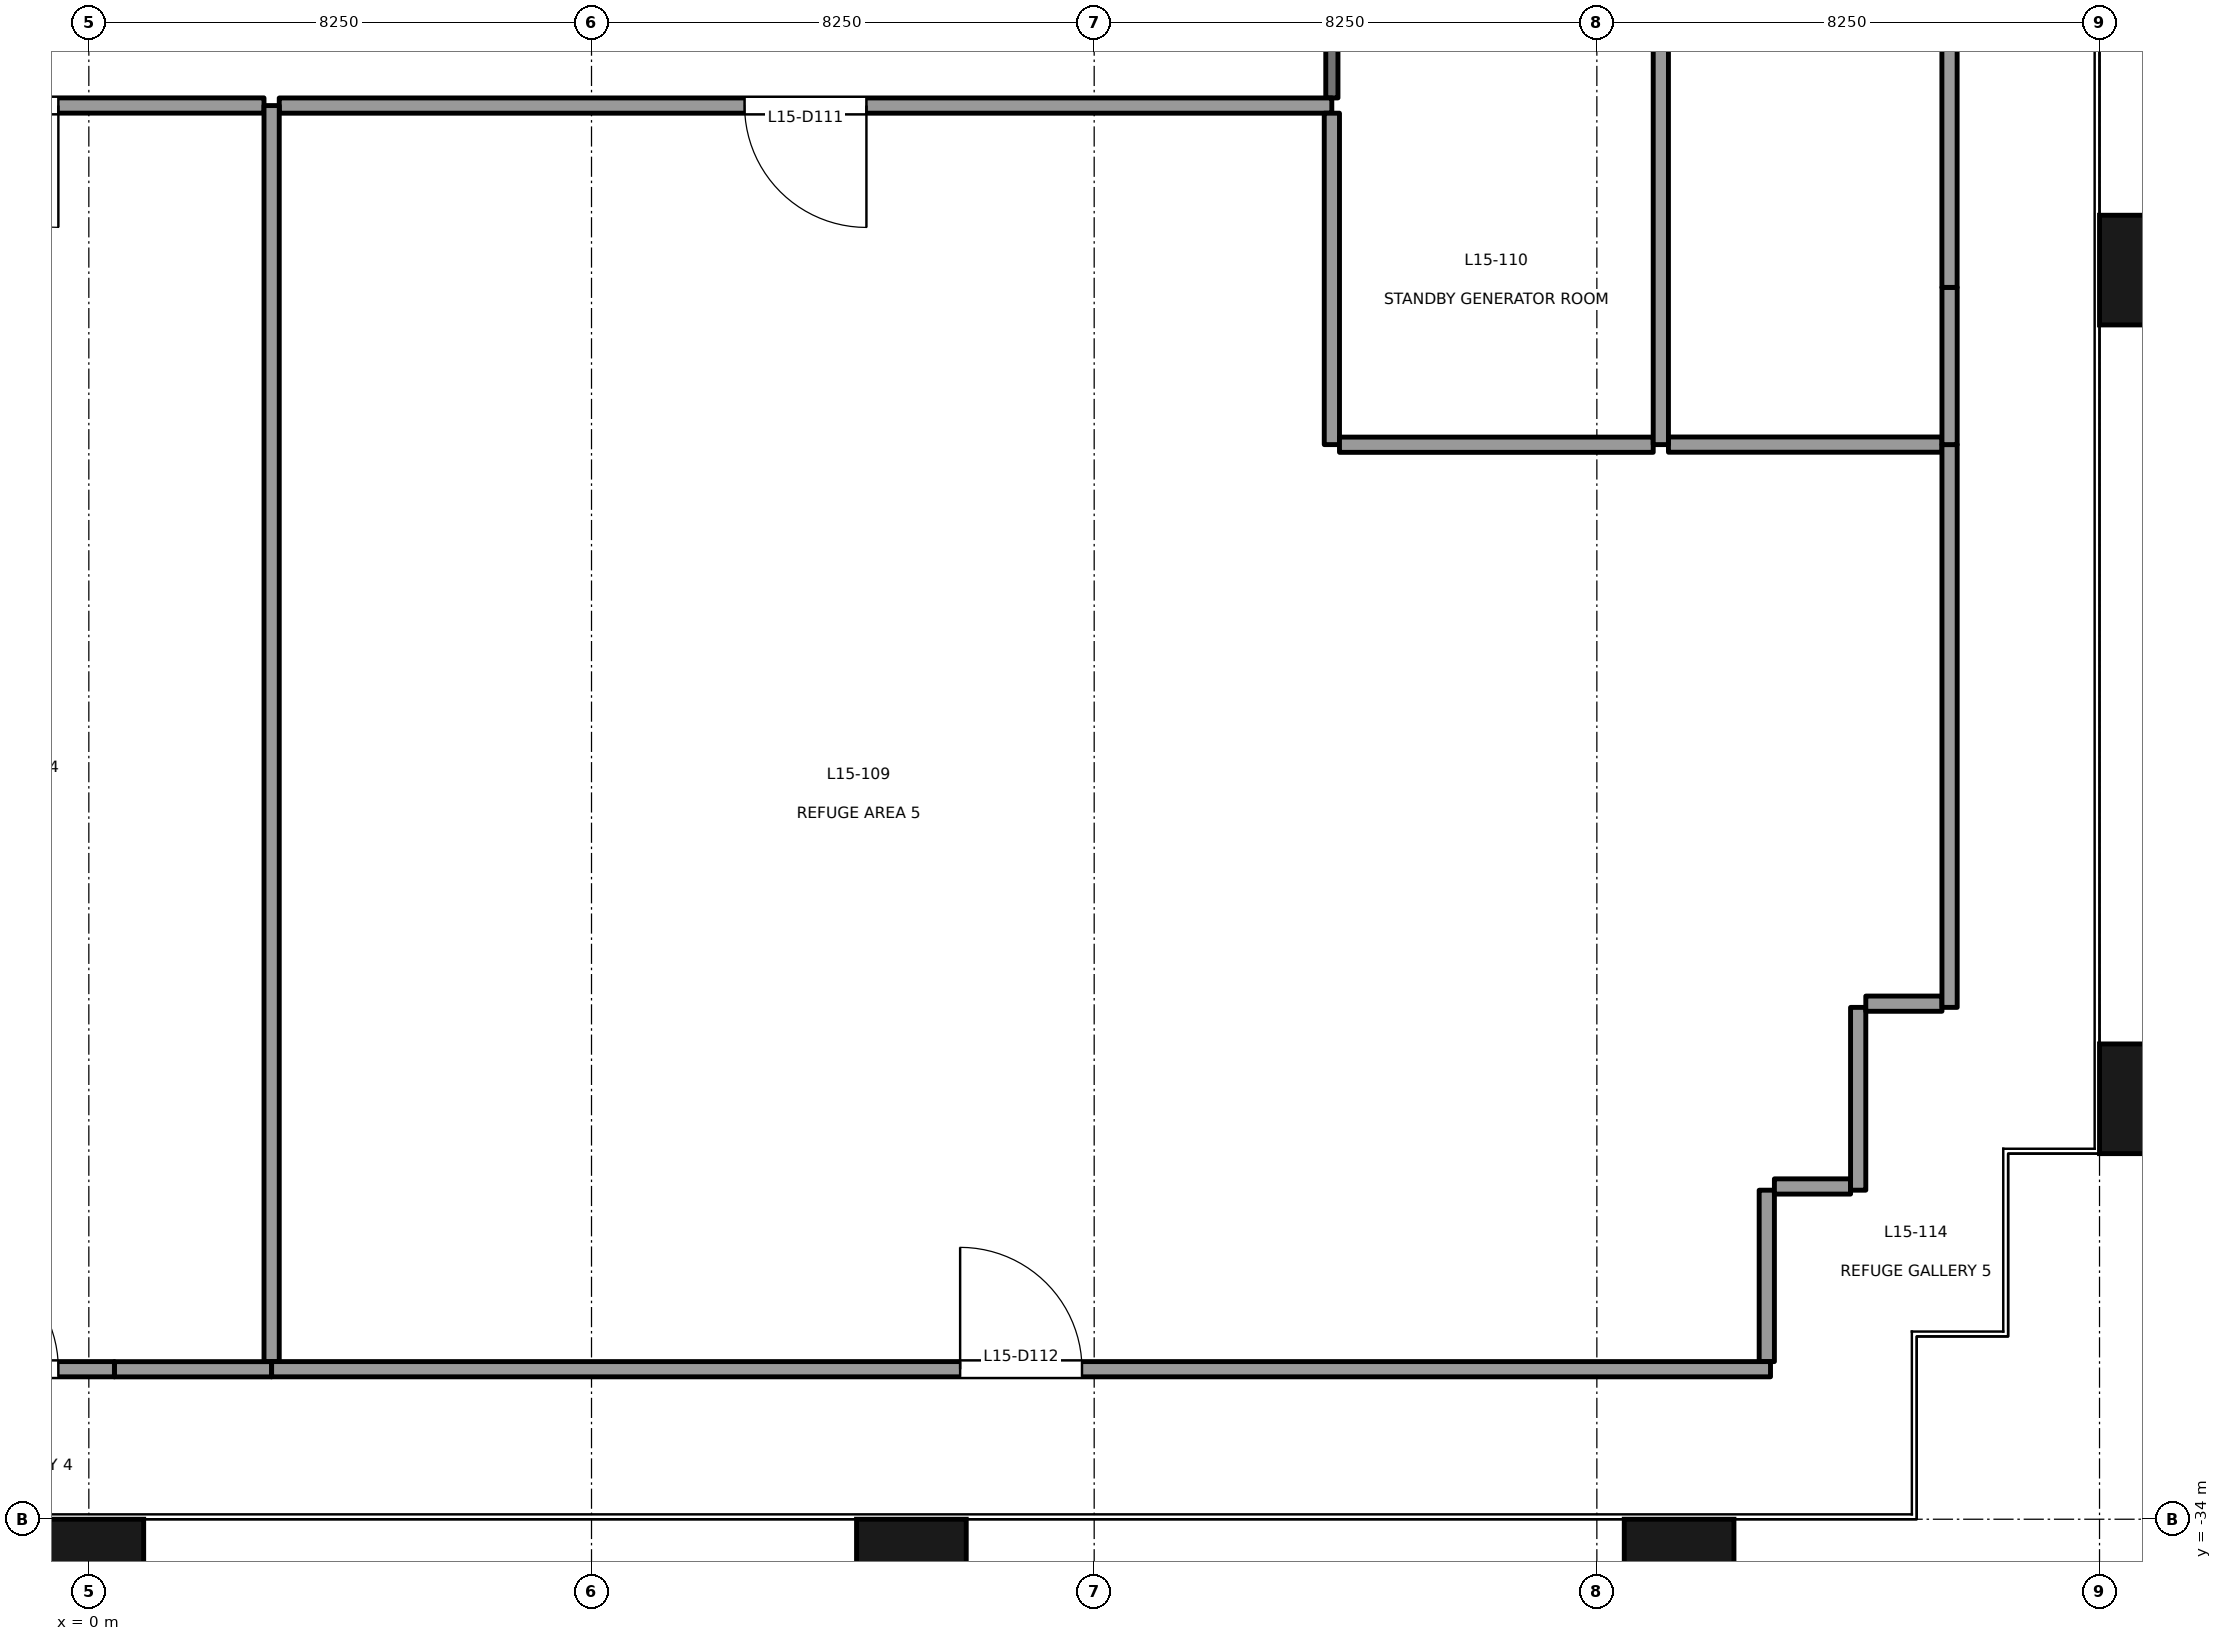
"""IFC4 building model, lengths in metres.
Left out: names, types, materials, properties, quantities, classifications, styles, units other than length and angle.
Written with IfcOpenShell. Run it as: python <this file> out.ifc"""

import sys

from ifc_helpers import new_model, si_unit, direction, frame, frame_2d, origin, origin_2d, place, context, subcontext, project, spatial, rectangle, extrude, element, fill, save


model = new_model("IFC4")
c1 = context("Model", 3, precision=1e-05, world=origin(), true_north=direction((0.0, 1.0)))
c2 = subcontext(c1, "Body", "Model", "MODEL_VIEW")
j1 = project(units=[si_unit("LENGTHUNIT", "METRE"), si_unit("PLANEANGLEUNIT", "RADIAN")], contexts=[c1])
p1 = place(None, origin())
s1 = spatial("IfcSite", under=j1, at=p1, CompositionType="ELEMENT")
p2 = place(p1, origin())
s2 = spatial("IfcBuilding", under=s1, at=p2, CompositionType="ELEMENT")
p3 = place(p2, frame((0.0, 0.0, 69.3)))
s3 = spatial("IfcBuildingStorey", under=s2, at=p3, CompositionType="ELEMENT", Elevation=69.3)
for number, where, z_axis, x_axis in (
    (1, (0.0, -34.9, -0.2), (0.0, 0.0, 1.0), (1.0, 0.0, 0.0)),
    (2, (13.5, -34.9, -0.2), (0.0, 0.0, 1.0), (1.0, 0.0, 0.0)),
    (3, (26.1, -34.9, -0.2), (0.0, 0.0, 1.0), (1.0, 0.0, 0.0)),
    (4, (33.9, -27.1, -0.2), (0.0, 0.0, 1.0), (0.0, 1.0, 0.0)),
    (5, (33.9, -13.5, -0.2), (0.0, 0.0, 1.0), (0.0, 1.0, 0.0)),
):
    element("IfcColumn", number, at=place(p3, frame(where, z_axis=z_axis, x_axis=x_axis)), inside=s3, PredefinedType="COLUMN", context=c2, shape_type="SweptSolid", body=[
        extrude(rectangle(XDim=1.8, YDim=1.8, at=origin_2d()), origin(), (0.0, 0.0, 1.0), 5.0),
    ])
p4 = place(p3, frame((2.875, -10.799, 0.0), z_axis=(0.0, 0.0, 1.0), x_axis=(-1.0, 0.0, 0.0)))
e6 = element("IfcWall", 6, at=p4, inside=s3, PredefinedType="PARTITIONING", context=c2, shape_type="SweptSolid", body=[
    extrude(rectangle(XDim=8.75, YDim=0.25, at=frame_2d((4.375, 0.0))), origin(), (0.0, 0.0, 1.0), 3.8),
])
p5 = place(p4, frame((3.375, 0.0, 0.0)))
e7 = element("IfcOpeningElement", 7, at=p5, cuts=e6, PredefinedType="OPENING", context=c2, shape_type="SweptSolid", body=[
    extrude(rectangle(XDim=2.0, YDim=2.1, at=frame_2d((1.0, 1.05))), frame((0.0, 0.135, 0.0), z_axis=(0.0, -1.0, 0.0), x_axis=(1.0, 0.0, 0.0)), (0.0, 0.0, 1.0), 0.271),
])
p6 = place(p3, frame((20.4, -10.8, 0.0), z_axis=(0.0, 0.0, 1.0), x_axis=(-1.0, 0.0, 0.0)))
e8 = element("IfcWall", 8, at=p6, inside=s3, PredefinedType="PARTITIONING", context=c2, shape_type="SweptSolid", body=[
    extrude(rectangle(XDim=17.275, YDim=0.25, at=frame_2d((8.637, 0.0))), origin(), (0.0, 0.0, 1.0), 2.15),
])
p7 = place(p6, frame((7.638, 0.0, 0.0)))
e9 = element("IfcOpeningElement", 9, at=p7, cuts=e8, PredefinedType="OPENING", context=c2, shape_type="SweptSolid", body=[
    extrude(rectangle(XDim=2.0, YDim=2.1, at=frame_2d((1.0, 1.05))), frame((0.0, 0.135, 0.0), z_axis=(0.0, -1.0, 0.0), x_axis=(1.0, 0.0, 0.0)), (0.0, 0.0, 1.0), 0.271),
])
p8 = place(p3, frame((20.401, -7.5, 0.0), z_axis=(0.0, 0.0, 1.0), x_axis=(0.0, -1.0, 0.0)))
e10 = element("IfcWall", 10, at=p8, inside=s3, PredefinedType="PARTITIONING", context=c2, shape_type="SweptSolid", body=[
    extrude(rectangle(XDim=3.175, YDim=0.2, at=frame_2d((1.587, 0.0))), origin(), (0.0, 0.0, 1.0), 4.2),
])
p9 = place(p8, frame((1.137, 0.0, 0.0)))
e11 = element("IfcOpeningElement", 11, at=p9, cuts=e10, PredefinedType="OPENING", context=c2, shape_type="SweptSolid", body=[
    extrude(rectangle(XDim=0.9, YDim=2.1, at=frame_2d((0.45, 1.05))), frame((0.0, 0.111, 0.0), z_axis=(0.0, -1.0, 0.0), x_axis=(1.0, 0.0, 0.0)), (0.0, 0.0, 1.0), 0.221),
])
p10 = place(p3, frame((3.0, -10.8, 0.0), z_axis=(0.0, 0.0, 1.0), x_axis=(0.0, -1.0, 0.0)))
e12 = element("IfcWall", 12, at=p10, inside=s3, PredefinedType="PARTITIONING", context=c2, shape_type="SweptSolid", body=[
    extrude(rectangle(XDim=20.613, YDim=0.25, at=frame_2d((10.307, 0.0))), origin(), (0.0, 0.0, 1.0), 4.8),
])
p11 = place(p3, frame((3.0, -31.539, 0.0), z_axis=(0.0, 0.0, 1.0), x_axis=(-1.0, 0.0, 0.0)))
e13 = element("IfcWall", 13, at=p11, inside=s3, PredefinedType="PARTITIONING", context=c2, shape_type="SweptSolid", body=[
    extrude(rectangle(XDim=2.58, YDim=0.25, at=frame_2d((1.29, 0.0))), origin(), (0.0, 0.0, 1.0), 4.8),
])
p12 = place(p3, frame((-3.42, -31.538, 0.0), z_axis=(0.0, 0.0, 1.0), x_axis=(1.0, 0.0, 0.0)))
e14 = element("IfcWall", 14, at=p12, inside=s3, PredefinedType="PARTITIONING", context=c2, shape_type="SweptSolid", body=[
    extrude(rectangle(XDim=3.84, YDim=0.25, at=frame_2d((1.92, 0.0))), origin(), (0.0, 0.0, 1.0), 3.8),
])
p13 = place(p12, frame((0.92, 0.0, 0.0)))
e15 = element("IfcOpeningElement", 15, at=p13, cuts=e14, PredefinedType="OPENING", context=c2, shape_type="SweptSolid", body=[
    extrude(rectangle(XDim=2.0, YDim=2.1, at=frame_2d((1.0, 1.05))), frame((0.0, 0.135, 0.0), z_axis=(0.0, -1.0, 0.0), x_axis=(1.0, 0.0, 0.0)), (0.0, 0.0, 1.0), 0.271),
])
p14 = place(p3, frame((20.401, -10.925, 0.0), z_axis=(0.0, 0.0, 1.0), x_axis=(0.0, -1.0, 0.0)))
e16 = element("IfcWall", 16, at=p14, inside=s3, PredefinedType="PARTITIONING", context=c2, shape_type="SweptSolid", body=[
    extrude(rectangle(XDim=5.439, YDim=0.25, at=frame_2d((2.719, 0.0))), origin(), (0.0, 0.0, 1.0), 4.0),
])
p15 = place(p3, frame((20.526, -16.366, 0.0), z_axis=(0.0, 0.0, 1.0), x_axis=(1.0, 0.0, 0.0)))
e17 = element("IfcWall", 17, at=p15, inside=s3, PredefinedType="PARTITIONING", context=c2, shape_type="SweptSolid", body=[
    extrude(rectangle(XDim=5.149, YDim=0.25, at=frame_2d((2.575, 0.0))), origin(), (0.0, 0.0, 1.0), 4.8),
])
p16 = place(p3, frame((25.925, -16.364, 0.0), z_axis=(0.0, 0.0, 1.0), x_axis=(1.0, 0.0, 0.0)))
e18 = element("IfcWall", 18, at=p16, inside=s3, PredefinedType="PARTITIONING", context=c2, shape_type="SweptSolid", body=[
    extrude(rectangle(XDim=4.489, YDim=0.25, at=frame_2d((2.245, 0.0))), origin(), (0.0, 0.0, 1.0), 4.8),
])
p17 = place(p3, frame((27.539, -28.6, 0.0), z_axis=(0.0, 0.0, 1.0), x_axis=(0.0, -1.0, 0.0)))
e19 = element("IfcWall", 19, at=p17, inside=s3, PredefinedType="PARTITIONING", context=c2, shape_type="SweptSolid", body=[
    extrude(rectangle(XDim=2.813, YDim=0.25, at=frame_2d((1.406, 0.0))), origin(), (0.0, 0.0, 1.0), 4.8),
])
p18 = place(p3, frame((3.0, -31.538, 0.0), z_axis=(0.0, 0.0, 1.0), x_axis=(1.0, 0.0, 0.0)))
e20 = element("IfcWall", 20, at=p18, inside=s3, PredefinedType="PARTITIONING", context=c2, shape_type="SweptSolid", body=[
    extrude(rectangle(XDim=24.6, YDim=0.25, at=frame_2d((12.3, 0.0))), origin(), (0.0, 0.0, 1.0), 2.15),
])
p19 = place(p18, frame((11.3, 0.0, 0.0)))
e21 = element("IfcOpeningElement", 21, at=p19, cuts=e20, PredefinedType="OPENING", context=c2, shape_type="SweptSolid", body=[
    extrude(rectangle(XDim=2.0, YDim=2.1, at=frame_2d((1.0, 1.05))), frame((0.0, 0.135, 0.0), z_axis=(0.0, -1.0, 0.0), x_axis=(1.0, 0.0, 0.0)), (0.0, 0.0, 1.0), 0.271),
])
p20 = place(p3, frame((28.914, -28.539, 0.0), z_axis=(0.0, 0.0, 1.0), x_axis=(-1.0, 0.0, 0.0)))
e22 = element("IfcWall", 22, at=p20, inside=s3, PredefinedType="PARTITIONING", context=c2, shape_type="SweptSolid", body=[
    extrude(rectangle(XDim=1.25, YDim=0.25, at=frame_2d((0.625, 0.0))), origin(), (0.0, 0.0, 1.0), 4.8),
])
p21 = place(p3, frame((29.039, -25.6, 0.0), z_axis=(0.0, 0.0, 1.0), x_axis=(0.0, -1.0, 0.0)))
e23 = element("IfcWall", 23, at=p21, inside=s3, PredefinedType="PARTITIONING", context=c2, shape_type="SweptSolid", body=[
    extrude(rectangle(XDim=3.0, YDim=0.25, at=frame_2d((1.5, 0.0))), origin(), (0.0, 0.0, 1.0), 4.8),
])
p22 = place(p3, frame((30.414, -25.539, 0.0), z_axis=(0.0, 0.0, 1.0), x_axis=(-1.0, 0.0, 0.0)))
e24 = element("IfcWall", 24, at=p22, inside=s3, PredefinedType="PARTITIONING", context=c2, shape_type="SweptSolid", body=[
    extrude(rectangle(XDim=1.25, YDim=0.25, at=frame_2d((0.625, 0.0))), origin(), (0.0, 0.0, 1.0), 4.8),
])
p23 = place(p3, frame((30.539, -16.364, 0.0), z_axis=(0.0, 0.0, 1.0), x_axis=(0.0, -1.0, 0.0)))
e25 = element("IfcWall", 25, at=p23, inside=s3, PredefinedType="PARTITIONING", context=c2, shape_type="SweptSolid", body=[
    extrude(rectangle(XDim=9.236, YDim=0.25, at=frame_2d((4.618, 0.0))), origin(), (0.0, 0.0, 1.0), 4.2),
])
p24 = place(p3, frame((25.8, -7.364, 0.0), z_axis=(0.0, 0.0, 1.0), x_axis=(0.0, -1.0, 0.0)))
e26 = element("IfcWall", 26, at=p24, inside=s3, PredefinedType="PARTITIONING", context=c2, shape_type="SweptSolid", body=[
    extrude(rectangle(XDim=9.0, YDim=0.25, at=frame_2d((4.5, 0.0))), origin(), (0.0, 0.0, 1.0), 4.0),
])
p25 = place(p3, frame((30.539, -13.784, 0.0), z_axis=(0.0, 0.0, 1.0), x_axis=(0.0, -1.0, 0.0)))
e27 = element("IfcWall", 27, at=p25, inside=s3, PredefinedType="PARTITIONING", context=c2, shape_type="SweptSolid", body=[
    extrude(rectangle(XDim=2.58, YDim=0.25, at=frame_2d((1.29, 0.0))), origin(), (0.0, 0.0, 1.0), 4.8),
])
p26 = place(p3, frame((30.538, -13.784, 0.0), z_axis=(0.0, 0.0, 1.0), x_axis=(0.0, 1.0, 0.0)))
e28 = element("IfcWall", 28, at=p26, inside=s3, PredefinedType="PARTITIONING", context=c2, shape_type="SweptSolid", body=[
    extrude(rectangle(XDim=11.966, YDim=0.25, at=frame_2d((5.983, 0.0))), origin(), (0.0, 0.0, 1.0), 4.0),
])
p27 = place(p26, frame((4.983, 0.0, 0.0)))
e29 = element("IfcOpeningElement", 29, at=p27, cuts=e28, PredefinedType="OPENING", context=c2, shape_type="SweptSolid", body=[
    extrude(rectangle(XDim=2.0, YDim=2.1, at=frame_2d((1.0, 1.05))), frame((0.0, 0.135, 0.0), z_axis=(0.0, -1.0, 0.0), x_axis=(1.0, 0.0, 0.0)), (0.0, 0.0, 1.0), 0.271),
])
p28 = place(p5, origin())
e30 = element("IfcDoor", 30, at=p28, inside=s3, OperationType="DOUBLE_DOOR_SINGLE_SWING", PredefinedType="DOOR", context=c2, shape_type="SweptSolid", body=[
    extrude(rectangle(XDim=2.0, YDim=2.1, at=frame_2d((1.0, 1.05))), frame((0.0, 0.025, 0.0), z_axis=(0.0, -1.0, 0.0), x_axis=(1.0, 0.0, 0.0)), (0.0, 0.0, 1.0), 0.05),
])
fill(e7, e30)
p29 = place(p13, origin())
e31 = element("IfcDoor", 31, at=p29, inside=s3, OperationType="DOUBLE_DOOR_SINGLE_SWING", PredefinedType="DOOR", context=c2, shape_type="SweptSolid", body=[
    extrude(rectangle(XDim=2.0, YDim=2.1, at=frame_2d((1.0, 1.05))), frame((0.0, 0.025, 0.0), z_axis=(0.0, -1.0, 0.0), x_axis=(1.0, 0.0, 0.0)), (0.0, 0.0, 1.0), 0.05),
])
fill(e15, e31)
p30 = place(p7, origin())
e32 = element("IfcDoor", 32, at=p30, inside=s3, OperationType="DOUBLE_DOOR_SINGLE_SWING", PredefinedType="DOOR", context=c2, shape_type="SweptSolid", body=[
    extrude(rectangle(XDim=2.0, YDim=2.1, at=frame_2d((1.0, 1.05))), frame((0.0, 0.025, 0.0), z_axis=(0.0, -1.0, 0.0), x_axis=(1.0, 0.0, 0.0)), (0.0, 0.0, 1.0), 0.05),
])
fill(e9, e32)
p31 = place(p19, origin())
e33 = element("IfcDoor", 33, at=p31, inside=s3, OperationType="DOUBLE_DOOR_SINGLE_SWING", PredefinedType="DOOR", context=c2, shape_type="SweptSolid", body=[
    extrude(rectangle(XDim=2.0, YDim=2.1, at=frame_2d((1.0, 1.05))), frame((0.0, 0.025, 0.0), z_axis=(0.0, -1.0, 0.0), x_axis=(1.0, 0.0, 0.0)), (0.0, 0.0, 1.0), 0.05),
])
fill(e21, e33)
save(model, sys.argv[1])
